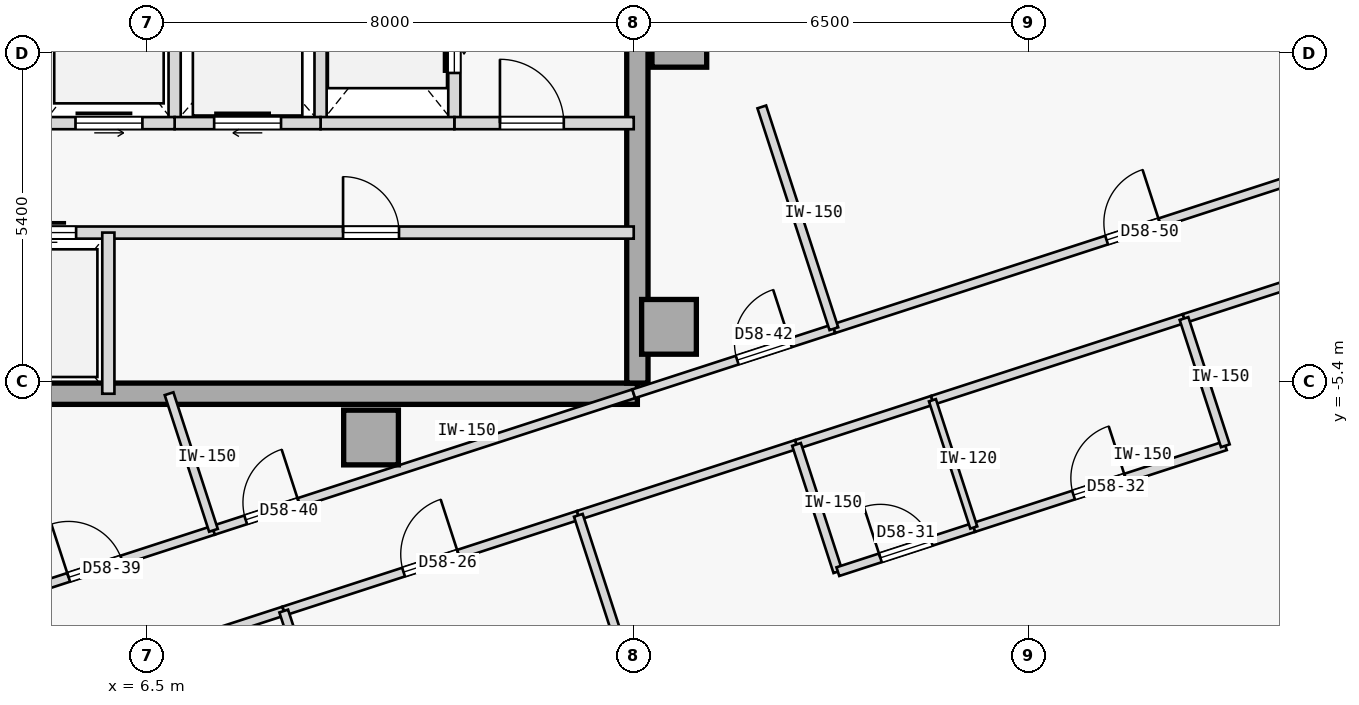
"""IFC4 building model, lengths in metres.
Left out: names, types, materials, properties, quantities, classifications, styles, units other than length and angle.
Written with IfcOpenShell. Run it as: python <this file> out.ifc"""

import sys

from ifc_helpers import new_model, si_unit, direction, frame, frame_2d, origin, origin_2d, place, context, subcontext, project, spatial, rectangle, extrude, element, fill, save


model = new_model("IFC4")
c1 = context("Model", 3, precision=1e-05, world=origin(), true_north=direction((0.0, 1.0)))
c2 = subcontext(c1, "Body", "Model", "MODEL_VIEW")
j1 = project(units=[si_unit("LENGTHUNIT", "METRE"), si_unit("PLANEANGLEUNIT", "RADIAN")], contexts=[c1])
p1 = place(None, origin())
s1 = spatial("IfcSite", under=j1, at=p1, CompositionType="ELEMENT")
p2 = place(p1, origin())
s2 = spatial("IfcBuilding", under=s1, at=p2, CompositionType="ELEMENT")
p3 = place(p2, frame((0.0, 0.0, 220.95)))
s3 = spatial("IfcBuildingStorey", under=s2, at=p3, CompositionType="ELEMENT", Elevation=220.95)
for number, where, z_axis, x_axis in (
    (1, (15.25, 0.22, 0.0), (0.0, 0.0, 1.0), (1.0, 0.0, 0.0)),
    (2, (15.08, -4.5, 0.0), (0.0, 0.0, 1.0), (1.0, 0.0, 0.0)),
    (3, (10.18, -6.32, 0.0), (0.0, 0.0, 1.0), (1.0, 0.0, 0.0)),
):
    element("IfcColumn", number, at=place(p3, frame(where, z_axis=z_axis, x_axis=x_axis)), inside=s3, PredefinedType="COLUMN", context=c2, shape_type="SweptSolid", body=[
        extrude(rectangle(XDim=0.9, YDim=0.9, at=origin_2d()), origin(), (0.0, 0.0, 1.0), 3.35),
    ])
p4 = place(p3, frame((3.7, -5.6, 0.0), z_axis=(0.0, 0.0, 1.0), x_axis=(1.0, 0.0, 0.0)))
e4 = element("IfcWall", 4, at=p4, inside=s3, PredefinedType="SHEAR", context=c2, shape_type="SweptSolid", body=[
    extrude(rectangle(XDim=10.86, YDim=0.35, at=frame_2d((5.43, 0.0))), origin(), (0.0, 0.0, 1.0), 3.125),
])
p5 = place(p3, frame((14.56, -5.425, 0.0), z_axis=(0.0, 0.0, 1.0), x_axis=(0.0, 1.0, 0.0)))
e5 = element("IfcWall", 5, at=p5, inside=s3, PredefinedType="SHEAR", context=c2, shape_type="SweptSolid", body=[
    extrude(rectangle(XDim=10.85, YDim=0.35, at=frame_2d((5.425, 0.0))), origin(), (0.0, 0.0, 1.0), 3.125),
])
p6 = place(p3, frame((11.55, -1.15, 0.0), z_axis=(0.0, 0.0, 1.0), x_axis=(0.0, 1.0, 0.0)))
e6 = element("IfcWall", 6, at=p6, inside=s3, PredefinedType="STANDARD", context=c2, shape_type="SweptSolid", body=[
    extrude(rectangle(XDim=2.75, YDim=0.2, at=frame_2d((1.375, 0.0))), origin(), (0.0, 0.0, 1.0), 3.125),
])
p7 = place(p6, frame((0.825, 0.0, 0.0)))
e7 = element("IfcOpeningElement", 7, at=p7, cuts=e6, PredefinedType="OPENING", context=c2, shape_type="SweptSolid", body=[
    extrude(rectangle(XDim=1.1, YDim=2.15, at=frame_2d((0.55, 1.075))), frame((0.0, 0.11, 0.0), z_axis=(0.0, -1.0, 0.0), x_axis=(1.0, 0.0, 0.0)), (0.0, 0.0, 1.0), 0.22),
])
p8 = place(p3, frame((9.35, -1.15, 0.0), z_axis=(0.0, 0.0, 1.0), x_axis=(0.0, 1.0, 0.0)))
e8 = element("IfcWall", 8, at=p8, inside=s3, PredefinedType="STANDARD", context=c2, shape_type="SweptSolid", body=[
    extrude(rectangle(XDim=2.75, YDim=0.2, at=frame_2d((1.375, 0.0))), origin(), (0.0, 0.0, 1.0), 3.125),
])
p9 = place(p3, frame((11.55, -1.15, 0.0), z_axis=(0.0, 0.0, 1.0), x_axis=(1.0, 0.0, 0.0)))
e9 = element("IfcWall", 9, at=p9, inside=s3, PredefinedType="STANDARD", context=c2, shape_type="SweptSolid", body=[
    extrude(rectangle(XDim=2.95, YDim=0.2, at=frame_2d((1.475, 0.0))), origin(), (0.0, 0.0, 1.0), 3.125),
])
p10 = place(p9, frame((0.75, 0.0, 0.0)))
e10 = element("IfcOpeningElement", 10, at=p10, cuts=e9, PredefinedType="OPENING", context=c2, shape_type="SweptSolid", body=[
    extrude(rectangle(XDim=1.05, YDim=2.18, at=frame_2d((0.525, 1.09))), frame((0.0, 0.11, 0.0), z_axis=(0.0, -1.0, 0.0), x_axis=(1.0, 0.0, 0.0)), (0.0, 0.0, 1.0), 0.22),
])
p11 = place(p3, frame((9.35, -1.15, 0.0), z_axis=(0.0, 0.0, 1.0), x_axis=(1.0, 0.0, 0.0)))
e11 = element("IfcWall", 11, at=p11, inside=s3, PredefinedType="STANDARD", context=c2, shape_type="SweptSolid", body=[
    extrude(rectangle(XDim=2.2, YDim=0.2, at=frame_2d((1.1, 0.0))), origin(), (0.0, 0.0, 1.0), 3.125),
])
p12 = place(p3, frame((6.95, -1.15, 0.0), z_axis=(0.0, 0.0, 1.0), x_axis=(0.0, 1.0, 0.0)))
e12 = element("IfcWall", 12, at=p12, inside=s3, PredefinedType="STANDARD", context=c2, shape_type="SweptSolid", body=[
    extrude(rectangle(XDim=2.75, YDim=0.2, at=frame_2d((1.375, 0.0))), origin(), (0.0, 0.0, 1.0), 3.125),
])
p13 = place(p3, frame((6.95, -1.15, 0.0), z_axis=(0.0, 0.0, 1.0), x_axis=(1.0, 0.0, 0.0)))
e13 = element("IfcWall", 13, at=p13, inside=s3, PredefinedType="STANDARD", context=c2, shape_type="SweptSolid", body=[
    extrude(rectangle(XDim=2.4, YDim=0.2, at=frame_2d((1.2, 0.0))), origin(), (0.0, 0.0, 1.0), 3.125),
])
p14 = place(p13, frame((0.65, 0.0, 0.0)))
e14 = element("IfcOpeningElement", 14, at=p14, cuts=e13, PredefinedType="OPENING", context=c2, shape_type="SweptSolid", body=[
    extrude(rectangle(XDim=1.1, YDim=2.15, at=frame_2d((0.55, 1.075))), frame((0.0, 0.11, 0.0), z_axis=(0.0, -1.0, 0.0), x_axis=(1.0, 0.0, 0.0)), (0.0, 0.0, 1.0), 0.22),
])
p15 = place(p3, frame((4.79, -1.15, 0.0), z_axis=(0.0, 0.0, 1.0), x_axis=(1.0, 0.0, 0.0)))
e15 = element("IfcWall", 15, at=p15, inside=s3, PredefinedType="STANDARD", context=c2, shape_type="SweptSolid", body=[
    extrude(rectangle(XDim=2.16, YDim=0.2, at=frame_2d((1.08, 0.0))), origin(), (0.0, 0.0, 1.0), 3.125),
])
p16 = place(p15, frame((0.53, 0.0, 0.0)))
e16 = element("IfcOpeningElement", 16, at=p16, cuts=e15, PredefinedType="OPENING", context=c2, shape_type="SweptSolid", body=[
    extrude(rectangle(XDim=1.1, YDim=2.15, at=frame_2d((0.55, 1.075))), frame((0.0, 0.11, 0.0), z_axis=(0.0, -1.0, 0.0), x_axis=(1.0, 0.0, 0.0)), (0.0, 0.0, 1.0), 0.22),
])
p17 = place(p3, frame((3.7, -2.95, 0.0), z_axis=(0.0, 0.0, 1.0), x_axis=(1.0, 0.0, 0.0)))
e17 = element("IfcWall", 17, at=p17, inside=s3, PredefinedType="STANDARD", context=c2, shape_type="SweptSolid", body=[
    extrude(rectangle(XDim=10.8, YDim=0.2, at=frame_2d((5.4, 0.0))), origin(), (0.0, 0.0, 1.0), 3.125),
])
p18 = place(p17, frame((0.53, 0.0, 0.0)))
e18 = element("IfcOpeningElement", 18, at=p18, cuts=e17, PredefinedType="OPENING", context=c2, shape_type="SweptSolid", body=[
    extrude(rectangle(XDim=1.1, YDim=2.15, at=frame_2d((0.55, 1.075))), frame((0.0, 0.11, 0.0), z_axis=(0.0, -1.0, 0.0), x_axis=(1.0, 0.0, 0.0)), (0.0, 0.0, 1.0), 0.22),
])
p19 = place(p17, frame((6.02, 0.0, 0.0)))
e19 = element("IfcOpeningElement", 19, at=p19, cuts=e17, PredefinedType="OPENING", context=c2, shape_type="SweptSolid", body=[
    extrude(rectangle(XDim=0.92, YDim=2.15, at=frame_2d((0.46, 1.075))), frame((0.0, 0.11, 0.0), z_axis=(0.0, -1.0, 0.0), x_axis=(1.0, 0.0, 0.0)), (0.0, 0.0, 1.0), 0.22),
])
p20 = place(p3, frame((5.86, -5.6, 0.0), z_axis=(0.0, 0.0, 1.0), x_axis=(0.0, 1.0, 0.0)))
e20 = element("IfcWall", 20, at=p20, inside=s3, PredefinedType="STANDARD", context=c2, shape_type="SweptSolid", body=[
    extrude(rectangle(XDim=2.65, YDim=0.2, at=frame_2d((1.325, 0.0))), origin(), (0.0, 0.0, 1.0), 3.125),
])
p21 = place(p3, frame((8.744, -9.174, 0.0), z_axis=(0.0, 0.0, 1.0), x_axis=(0.95105238152, 0.309029719615, 0.0)))
e21 = element("IfcWall", 21, at=p21, inside=s3, PredefinedType="PARTITIONING", context=c2, shape_type="SweptSolid", body=[
    extrude(rectangle(XDim=5.094, YDim=0.15, at=frame_2d((2.547, 0.0))), origin(), (0.0, 0.0, 1.0), 3.125),
])
p22 = place(p21, frame((2.072, 0.0, 0.0)))
e22 = element("IfcOpeningElement", 22, at=p22, cuts=e21, PredefinedType="OPENING", context=c2, shape_type="SweptSolid", body=[
    extrude(rectangle(XDim=0.95, YDim=2.15, at=frame_2d((0.475, 1.075))), frame((0.0, 0.085, 0.0), z_axis=(0.0, -1.0, 0.0), x_axis=(1.0, 0.0, 0.0)), (0.0, 0.0, 1.0), 0.17),
])
p23 = place(p3, frame((4.607, -10.518, 0.0), z_axis=(0.0, 0.0, 1.0), x_axis=(0.951052627573, 0.309028962374, 0.0)))
e23 = element("IfcWall", 23, at=p23, inside=s3, PredefinedType="PARTITIONING", context=c2, shape_type="SweptSolid", body=[
    extrude(rectangle(XDim=4.35, YDim=0.15, at=frame_2d((2.175, 0.0))), origin(), (0.0, 0.0, 1.0), 3.125),
])
p24 = place(p3, frame((13.589, -7.6, 0.0), z_axis=(0.0, 0.0, 1.0), x_axis=(0.95105023481, 0.30903632613, 0.0)))
e24 = element("IfcWall", 24, at=p24, inside=s3, PredefinedType="PARTITIONING", context=c2, shape_type="SweptSolid", body=[
    extrude(rectangle(XDim=3.773, YDim=0.15, at=frame_2d((1.886, 0.0))), origin(), (0.0, 0.0, 1.0), 3.125),
])
p25 = place(p3, frame((23.549, -4.363, 0.0), z_axis=(0.0, 0.0, 1.0), x_axis=(0.951054649174, 0.309022740723, 0.0)))
e25 = element("IfcWall", 25, at=p25, inside=s3, PredefinedType="PARTITIONING", context=c2, shape_type="SweptSolid", body=[
    extrude(rectangle(XDim=6.799, YDim=0.15, at=frame_2d((3.399, 0.0))), origin(), (0.0, 0.0, 1.0), 3.125),
])
p26 = place(p25, frame((2.925, 0.0, 0.0)))
e26 = element("IfcOpeningElement", 26, at=p26, cuts=e25, PredefinedType="OPENING", context=c2, shape_type="SweptSolid", body=[
    extrude(rectangle(XDim=0.95, YDim=2.15, at=frame_2d((0.475, 1.075))), frame((0.0, 0.085, 0.0), z_axis=(0.0, -1.0, 0.0), x_axis=(1.0, 0.0, 0.0)), (0.0, 0.0, 1.0), 0.17),
])
p27 = place(p3, frame((17.177, -6.434, 0.0), z_axis=(0.0, 0.0, 1.0), x_axis=(0.951066131077, 0.308987401554, 0.0)))
e27 = element("IfcWall", 27, at=p27, inside=s3, PredefinedType="PARTITIONING", context=c2, shape_type="SweptSolid", body=[
    extrude(rectangle(XDim=2.35, YDim=0.15, at=frame_2d((1.175, 0.0))), origin(), (0.0, 0.0, 1.0), 3.125),
])
p28 = place(p3, frame((19.412, -5.708, 0.0), z_axis=(0.0, 0.0, 1.0), x_axis=(0.951057987102, 0.309012467661, 0.0)))
e28 = element("IfcWall", 28, at=p28, inside=s3, PredefinedType="PARTITIONING", context=c2, shape_type="SweptSolid", body=[
    extrude(rectangle(XDim=4.35, YDim=0.15, at=frame_2d((2.175, 0.0))), origin(), (0.0, 0.0, 1.0), 3.125),
])
p29 = place(p3, frame((3.7, -9.109, 0.0), z_axis=(0.0, 0.0, 1.0), x_axis=(0.95106259184, 0.308998295145, 0.0)))
e29 = element("IfcWall", 29, at=p29, inside=s3, PredefinedType="PARTITIONING", context=c2, shape_type="SweptSolid", body=[
    extrude(rectangle(XDim=4.088, YDim=0.15, at=frame_2d((2.044, 0.0))), origin(), (0.0, 0.0, 1.0), 3.125),
])
p30 = place(p29, frame((1.584, 0.0, 0.0)))
e30 = element("IfcOpeningElement", 30, at=p30, cuts=e29, PredefinedType="OPENING", context=c2, shape_type="SweptSolid", body=[
    extrude(rectangle(XDim=0.92, YDim=2.15, at=frame_2d((0.46, 1.075))), frame((0.0, 0.085, 0.0), z_axis=(0.0, -1.0, 0.0), x_axis=(1.0, 0.0, 0.0)), (0.0, 0.0, 1.0), 0.17),
])
p31 = place(p3, frame((7.588, -7.846, 0.0), z_axis=(0.0, 0.0, 1.0), x_axis=(0.951058013903, 0.309012385174, 0.0)))
e31 = element("IfcWall", 31, at=p31, inside=s3, PredefinedType="PARTITIONING", context=c2, shape_type="SweptSolid", body=[
    extrude(rectangle(XDim=7.267, YDim=0.15, at=frame_2d((3.634, 0.0))), origin(), (0.0, 0.0, 1.0), 3.125),
])
p32 = place(p31, frame((0.557, 0.0, 0.0)))
e32 = element("IfcOpeningElement", 32, at=p32, cuts=e31, PredefinedType="OPENING", context=c2, shape_type="SweptSolid", body=[
    extrude(rectangle(XDim=0.92, YDim=2.15, at=frame_2d((0.46, 1.075))), frame((0.0, 0.085, 0.0), z_axis=(0.0, -1.0, 0.0), x_axis=(1.0, 0.0, 0.0)), (0.0, 0.0, 1.0), 0.17),
])
p33 = place(p3, frame((14.5, -5.6, 0.0), z_axis=(0.0, 0.0, 1.0), x_axis=(0.951047546178, 0.309044600193, 0.0)))
e33 = element("IfcWall", 33, at=p33, inside=s3, PredefinedType="PARTITIONING", context=c2, shape_type="SweptSolid", body=[
    extrude(rectangle(XDim=3.461, YDim=0.15, at=frame_2d((1.73, 0.0))), origin(), (0.0, 0.0, 1.0), 3.125),
])
p34 = place(p33, frame((1.79, 0.0, 0.0)))
e34 = element("IfcOpeningElement", 34, at=p34, cuts=e33, PredefinedType="OPENING", context=c2, shape_type="SweptSolid", body=[
    extrude(rectangle(XDim=0.92, YDim=2.15, at=frame_2d((0.46, 1.075))), frame((0.0, 0.085, 0.0), z_axis=(0.0, -1.0, 0.0), x_axis=(1.0, 0.0, 0.0)), (0.0, 0.0, 1.0), 0.17),
])
p35 = place(p3, frame((17.791, -4.531, 0.0), z_axis=(0.0, 0.0, 1.0), x_axis=(0.951056769902, 0.309016213852, 0.0)))
e35 = element("IfcWall", 35, at=p35, inside=s3, PredefinedType="PARTITIONING", context=c2, shape_type="SweptSolid", body=[
    extrude(rectangle(XDim=10.352, YDim=0.15, at=frame_2d((5.176, 0.0))), origin(), (0.0, 0.0, 1.0), 3.125),
])
p36 = place(p35, frame((4.716, 0.0, 0.0)))
e36 = element("IfcOpeningElement", 36, at=p36, cuts=e35, PredefinedType="OPENING", context=c2, shape_type="SweptSolid", body=[
    extrude(rectangle(XDim=0.92, YDim=2.15, at=frame_2d((0.46, 1.075))), frame((0.0, 0.085, 0.0), z_axis=(0.0, -1.0, 0.0), x_axis=(1.0, 0.0, 0.0)), (0.0, 0.0, 1.0), 0.17),
])
p37 = place(p3, frame((27.637, -1.332, 0.0), z_axis=(0.0, 0.0, 1.0), x_axis=(-0.309040411618, 0.951048907253, 0.0)))
e37 = element("IfcWall", 37, at=p37, inside=s3, PredefinedType="PARTITIONING", context=c2, shape_type="SweptSolid", body=[
    extrude(rectangle(XDim=8.826, YDim=0.15, at=frame_2d((4.413, 0.0))), origin(), (0.0, 0.0, 1.0), 3.125),
])
p38 = place(p3, frame((9.424, -11.266, 0.0), z_axis=(0.0, 0.0, 1.0), x_axis=(-0.309060979314, 0.951042223598, 0.0)))
e38 = element("IfcWall", 38, at=p38, inside=s3, PredefinedType="PARTITIONING", context=c2, shape_type="SweptSolid", body=[
    extrude(rectangle(XDim=2.2, YDim=0.15, at=frame_2d((1.1, 0.0))), origin(), (0.0, 0.0, 1.0), 3.125),
])
p39 = place(p3, frame((16.636, -16.979, 0.0), z_axis=(0.0, 0.0, 1.0), x_axis=(-0.309022258842, 0.95105480575, 0.0)))
e39 = element("IfcWall", 39, at=p39, inside=s3, PredefinedType="PARTITIONING", context=c2, shape_type="SweptSolid", body=[
    extrude(rectangle(XDim=9.862, YDim=0.15, at=frame_2d((4.931, 0.0))), origin(), (0.0, 0.0, 1.0), 2.675),
])
p40 = place(p3, frame((17.857, -8.526, 0.0), z_axis=(0.0, 0.0, 1.0), x_axis=(-0.309060979314, 0.951042223598, 0.0)))
e40 = element("IfcWall", 40, at=p40, inside=s3, PredefinedType="PARTITIONING", context=c2, shape_type="SweptSolid", body=[
    extrude(rectangle(XDim=2.2, YDim=0.15, at=frame_2d((1.1, 0.0))), origin(), (0.0, 0.0, 1.0), 3.125),
])
p41 = place(p3, frame((17.857, -8.526, 0.0), z_axis=(0.0, 0.0, 1.0), x_axis=(0.951066131077, 0.308987401554, 0.0)))
e41 = element("IfcWall", 41, at=p41, inside=s3, PredefinedType="PARTITIONING", context=c2, shape_type="SweptSolid", body=[
    extrude(rectangle(XDim=2.35, YDim=0.15, at=frame_2d((1.175, 0.0))), origin(), (0.0, 0.0, 1.0), 3.125),
])
p42 = place(p41, frame((0.735, 0.0, 0.0)))
e42 = element("IfcOpeningElement", 42, at=p42, cuts=e41, PredefinedType="OPENING", context=c2, shape_type="SweptSolid", body=[
    extrude(rectangle(XDim=0.88, YDim=2.15, at=frame_2d((0.44, 1.075))), frame((0.0, 0.085, 0.0), z_axis=(0.0, -1.0, 0.0), x_axis=(1.0, 0.0, 0.0)), (0.0, 0.0, 1.0), 0.17),
])
p43 = place(p3, frame((20.092, -7.8, 0.0), z_axis=(0.0, 0.0, 1.0), x_axis=(0.951057987102, 0.309012467661, 0.0)))
e43 = element("IfcWall", 43, at=p43, inside=s3, PredefinedType="PARTITIONING", context=c2, shape_type="SweptSolid", body=[
    extrude(rectangle(XDim=4.35, YDim=0.15, at=frame_2d((2.175, 0.0))), origin(), (0.0, 0.0, 1.0), 3.125),
])
p44 = place(p43, frame((1.725, 0.0, 0.0)))
e44 = element("IfcOpeningElement", 44, at=p44, cuts=e43, PredefinedType="OPENING", context=c2, shape_type="SweptSolid", body=[
    extrude(rectangle(XDim=0.9, YDim=2.15, at=frame_2d((0.45, 1.075))), frame((0.0, 0.085, 0.0), z_axis=(0.0, -1.0, 0.0), x_axis=(1.0, 0.0, 0.0)), (0.0, 0.0, 1.0), 0.17),
])
p45 = place(p3, frame((24.229, -6.456, 0.0), z_axis=(0.0, 0.0, 1.0), x_axis=(-0.309060979314, 0.951042223598, 0.0)))
e45 = element("IfcWall", 45, at=p45, inside=s3, PredefinedType="PARTITIONING", context=c2, shape_type="SweptSolid", body=[
    extrude(rectangle(XDim=2.2, YDim=0.15, at=frame_2d((1.1, 0.0))), origin(), (0.0, 0.0, 1.0), 3.125),
])
p46 = place(p3, frame((20.092, -7.8, 0.0), z_axis=(0.0, 0.0, 1.0), x_axis=(-0.309060979314, 0.951042223598, 0.0)))
e46 = element("IfcWall", 46, at=p46, inside=s3, PredefinedType="PARTITIONING", context=c2, shape_type="SweptSolid", body=[
    extrude(rectangle(XDim=2.2, YDim=0.12, at=frame_2d((1.1, 0.0))), origin(), (0.0, 0.0, 1.0), 3.125),
])
p47 = place(p3, frame((7.588, -7.846, 0.0), z_axis=(0.0, 0.0, 1.0), x_axis=(-0.309055688452, 0.951043942957, 0.0)))
e47 = element("IfcWall", 47, at=p47, inside=s3, PredefinedType="PARTITIONING", context=c2, shape_type="SweptSolid", body=[
    extrude(rectangle(XDim=2.362, YDim=0.15, at=frame_2d((1.181, 0.0))), origin(), (0.0, 0.0, 1.0), 3.125),
])
p48 = place(p3, frame((17.791, -4.531, 0.0), z_axis=(0.0, 0.0, 1.0), x_axis=(-0.309018414265, 0.951056054944, 0.0)))
e48 = element("IfcWall", 48, at=p48, inside=s3, PredefinedType="PARTITIONING", context=c2, shape_type="SweptSolid", body=[
    extrude(rectangle(XDim=3.835, YDim=0.15, at=frame_2d((1.917, 0.0))), origin(), (0.0, 0.0, 1.0), 3.125),
])
p49 = place(p10, origin())
e49 = element("IfcDoor", 49, at=p49, inside=s3, OperationType="SINGLE_SWING_LEFT", PredefinedType="DOOR", context=c2, shape_type="SweptSolid", body=[
    extrude(rectangle(XDim=1.05, YDim=2.18, at=frame_2d((0.525, 1.09))), frame((0.0, 0.025, 0.0), z_axis=(0.0, -1.0, 0.0), x_axis=(1.0, 0.0, 0.0)), (0.0, 0.0, 1.0), 0.05),
])
fill(e10, e49)
p50 = place(p7, origin())
e50 = element("IfcDoor", 50, at=p50, inside=s3, OperationType="SLIDING_TO_RIGHT", PredefinedType="DOOR", context=c2, shape_type="SweptSolid", body=[
    extrude(rectangle(XDim=1.1, YDim=2.15, at=frame_2d((0.55, 1.075))), frame((0.0, 0.025, 0.0), z_axis=(0.0, -1.0, 0.0), x_axis=(1.0, 0.0, 0.0)), (0.0, 0.0, 1.0), 0.05),
])
fill(e7, e50)
p51 = place(p14, origin())
e51 = element("IfcDoor", 51, at=p51, inside=s3, OperationType="SLIDING_TO_RIGHT", PredefinedType="DOOR", context=c2, shape_type="SweptSolid", body=[
    extrude(rectangle(XDim=1.1, YDim=2.15, at=frame_2d((0.55, 1.075))), frame((0.0, 0.025, 0.0), z_axis=(0.0, -1.0, 0.0), x_axis=(1.0, 0.0, 0.0)), (0.0, 0.0, 1.0), 0.05),
])
fill(e14, e51)
p52 = place(p16, origin())
e52 = element("IfcDoor", 52, at=p52, inside=s3, OperationType="SLIDING_TO_LEFT", PredefinedType="DOOR", context=c2, shape_type="SweptSolid", body=[
    extrude(rectangle(XDim=1.1, YDim=2.15, at=frame_2d((0.55, 1.075))), frame((0.0, 0.025, 0.0), z_axis=(0.0, -1.0, 0.0), x_axis=(1.0, 0.0, 0.0)), (0.0, 0.0, 1.0), 0.05),
])
fill(e16, e52)
p53 = place(p18, origin())
e53 = element("IfcDoor", 53, at=p53, inside=s3, OperationType="SLIDING_TO_RIGHT", PredefinedType="DOOR", context=c2, shape_type="SweptSolid", body=[
    extrude(rectangle(XDim=1.1, YDim=2.15, at=frame_2d((0.55, 1.075))), frame((0.0, 0.025, 0.0), z_axis=(0.0, -1.0, 0.0), x_axis=(1.0, 0.0, 0.0)), (0.0, 0.0, 1.0), 0.05),
])
fill(e18, e53)
p54 = place(p19, origin())
e54 = element("IfcDoor", 54, at=p54, inside=s3, OperationType="SINGLE_SWING_LEFT", PredefinedType="DOOR", context=c2, shape_type="SweptSolid", body=[
    extrude(rectangle(XDim=0.92, YDim=2.15, at=frame_2d((0.46, 1.075))), frame((0.0, 0.025, 0.0), z_axis=(0.0, -1.0, 0.0), x_axis=(1.0, 0.0, 0.0)), (0.0, 0.0, 1.0), 0.05),
])
fill(e19, e54)
p55 = place(p22, origin())
e55 = element("IfcDoor", 55, at=p55, inside=s3, OperationType="SINGLE_SWING_RIGHT", PredefinedType="DOOR", context=c2, shape_type="SweptSolid", body=[
    extrude(rectangle(XDim=0.95, YDim=2.15, at=frame_2d((0.475, 1.075))), frame((0.0, 0.025, 0.0), z_axis=(0.0, -1.0, 0.0), x_axis=(1.0, 0.0, 0.0)), (0.0, 0.0, 1.0), 0.05),
])
fill(e22, e55)
p56 = place(p42, origin())
e56 = element("IfcDoor", 56, at=p56, inside=s3, OperationType="SINGLE_SWING_LEFT", PredefinedType="DOOR", context=c2, shape_type="SweptSolid", body=[
    extrude(rectangle(XDim=0.88, YDim=2.15, at=frame_2d((0.44, 1.075))), frame((0.0, 0.025, 0.0), z_axis=(0.0, -1.0, 0.0), x_axis=(1.0, 0.0, 0.0)), (0.0, 0.0, 1.0), 0.05),
])
fill(e42, e56)
p57 = place(p44, origin())
e57 = element("IfcDoor", 57, at=p57, inside=s3, OperationType="SINGLE_SWING_RIGHT", PredefinedType="DOOR", context=c2, shape_type="SweptSolid", body=[
    extrude(rectangle(XDim=0.9, YDim=2.15, at=frame_2d((0.45, 1.075))), frame((0.0, 0.025, 0.0), z_axis=(0.0, -1.0, 0.0), x_axis=(1.0, 0.0, 0.0)), (0.0, 0.0, 1.0), 0.05),
])
fill(e44, e57)
p58 = place(p30, origin())
e58 = element("IfcDoor", 58, at=p58, inside=s3, OperationType="SINGLE_SWING_LEFT", PredefinedType="DOOR", context=c2, shape_type="SweptSolid", body=[
    extrude(rectangle(XDim=0.92, YDim=2.15, at=frame_2d((0.46, 1.075))), frame((0.0, 0.025, 0.0), z_axis=(0.0, -1.0, 0.0), x_axis=(1.0, 0.0, 0.0)), (0.0, 0.0, 1.0), 0.05),
])
fill(e30, e58)
p59 = place(p32, origin())
e59 = element("IfcDoor", 59, at=p59, inside=s3, OperationType="SINGLE_SWING_RIGHT", PredefinedType="DOOR", context=c2, shape_type="SweptSolid", body=[
    extrude(rectangle(XDim=0.92, YDim=2.15, at=frame_2d((0.46, 1.075))), frame((0.0, 0.025, 0.0), z_axis=(0.0, -1.0, 0.0), x_axis=(1.0, 0.0, 0.0)), (0.0, 0.0, 1.0), 0.05),
])
fill(e32, e59)
p60 = place(p34, origin())
e60 = element("IfcDoor", 60, at=p60, inside=s3, OperationType="SINGLE_SWING_RIGHT", PredefinedType="DOOR", context=c2, shape_type="SweptSolid", body=[
    extrude(rectangle(XDim=0.92, YDim=2.15, at=frame_2d((0.46, 1.075))), frame((0.0, 0.025, 0.0), z_axis=(0.0, -1.0, 0.0), x_axis=(1.0, 0.0, 0.0)), (0.0, 0.0, 1.0), 0.05),
])
fill(e34, e60)
p61 = place(p36, origin())
e61 = element("IfcDoor", 61, at=p61, inside=s3, OperationType="SINGLE_SWING_RIGHT", PredefinedType="DOOR", context=c2, shape_type="SweptSolid", body=[
    extrude(rectangle(XDim=0.92, YDim=2.15, at=frame_2d((0.46, 1.075))), frame((0.0, 0.025, 0.0), z_axis=(0.0, -1.0, 0.0), x_axis=(1.0, 0.0, 0.0)), (0.0, 0.0, 1.0), 0.05),
])
fill(e36, e61)
save(model, sys.argv[1])
